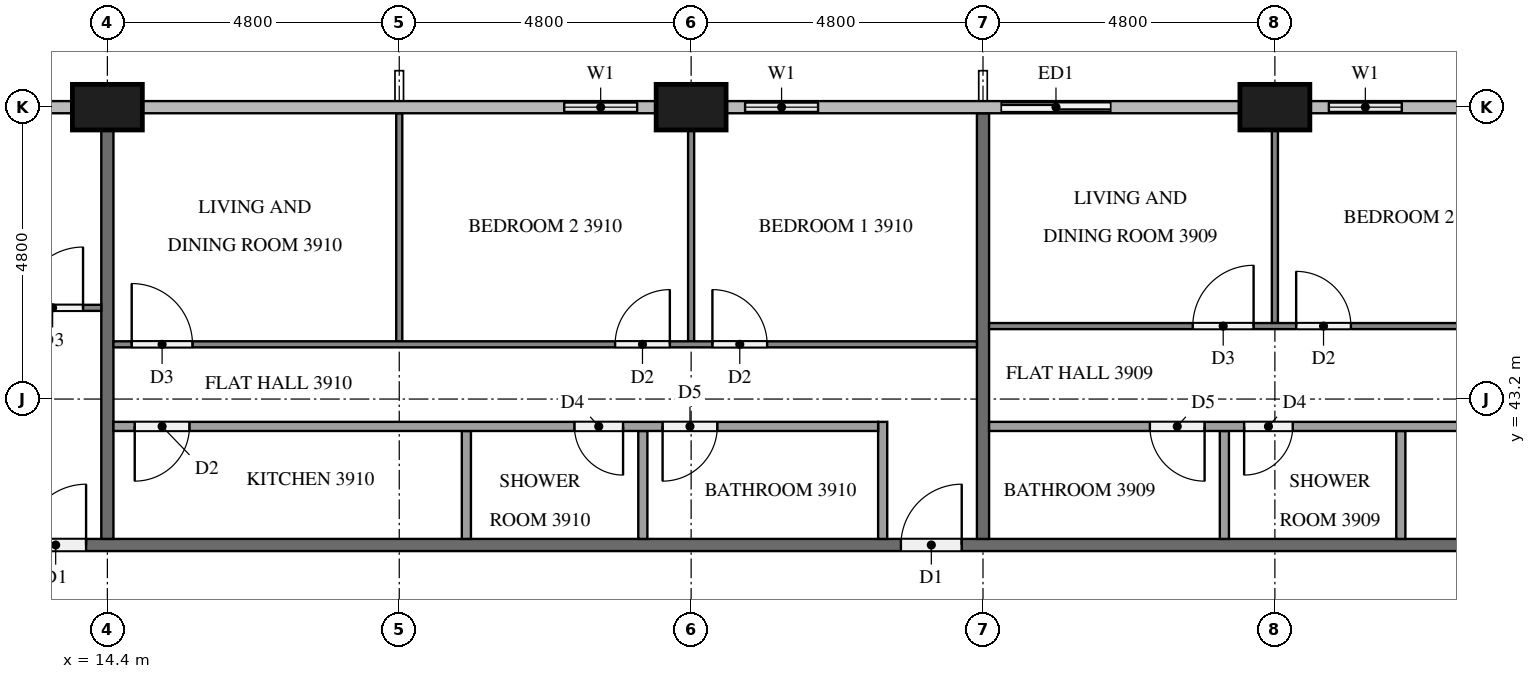
"""IFC4 building model, lengths in metres.
Left out: names, types, materials, properties, quantities, classifications, styles, units other than length and angle.
Written with IfcOpenShell. Run it as: python <this file> out.ifc"""

import sys

from ifc_helpers import new_model, si_unit, direction, frame, frame_2d, origin, origin_2d, place, context, subcontext, project, spatial, rectangle, extrude, element, fill, save


model = new_model("IFC4")
c1 = context("Model", 3, precision=1e-05, world=origin(), true_north=direction((0.0, 1.0)))
c2 = subcontext(c1, "Body", "Model", "MODEL_VIEW")
j1 = project(units=[si_unit("LENGTHUNIT", "METRE"), si_unit("PLANEANGLEUNIT", "RADIAN")], contexts=[c1])
p1 = place(None, origin())
s1 = spatial("IfcSite", under=j1, at=p1, CompositionType="ELEMENT")
p2 = place(p1, origin())
s2 = spatial("IfcBuilding", under=s1, at=p2, CompositionType="ELEMENT")
p3 = place(p2, frame((0.0, 0.0, 152.5)))
s3 = spatial("IfcBuildingStorey", under=s2, at=p3, CompositionType="ELEMENT", Elevation=152.5)
for number, where, z_axis, x_axis in (
    (1, (33.6, 48.0, 0.0), (0.0, 0.0, 1.0), (1.0, 0.0, 0.0)),
    (2, (24.0, 48.0, 0.0), (0.0, 0.0, 1.0), (1.0, 0.0, 0.0)),
    (3, (14.4, 48.0, 0.0), (0.0, 0.0, 1.0), (1.0, 0.0, 0.0)),
):
    element("IfcColumn", number, at=place(p3, frame(where, z_axis=z_axis, x_axis=x_axis)), inside=s3, PredefinedType="COLUMN", context=c2, shape_type="SweptSolid", body=[
        extrude(rectangle(XDim=1.15, YDim=0.75, at=origin_2d()), origin(), (0.0, 0.0, 1.0), 3.2),
    ])
p4 = place(p3, frame((36.0, 48.0, 0.0), z_axis=(0.0, 0.0, 1.0), x_axis=(-1.0, 0.0, 0.0)))
e4 = element("IfcWall", 4, at=p4, inside=s3, PredefinedType="SOLIDWALL", context=c2, shape_type="SweptSolid", body=[
    extrude(rectangle(XDim=1.825, YDim=0.15, at=frame_2d((0.913, 0.0))), origin(), (0.0, 0.0, 1.0), 3.2),
])
p5 = place(p4, frame((0.312, 0.0, 0.9)))
e5 = element("IfcOpeningElement", 5, at=p5, cuts=e4, PredefinedType="OPENING", context=c2, shape_type="SweptSolid", body=[
    extrude(rectangle(XDim=1.2, YDim=1.4, at=frame_2d((0.6, 0.7))), frame((0.0, 0.085, 0.0), z_axis=(0.0, -1.0, 0.0), x_axis=(1.0, 0.0, 0.0)), (0.0, 0.0, 1.0), 0.17),
])
p6 = place(p3, frame((31.2, 48.0, 0.0), z_axis=(0.0, 0.0, 1.0), x_axis=(-1.0, 0.0, 0.0)))
e6 = element("IfcWall", 6, at=p6, inside=s3, PredefinedType="SOLIDWALL", context=c2, shape_type="SweptSolid", body=[
    extrude(rectangle(XDim=2.4, YDim=0.15, at=frame_2d((1.2, 0.0))), origin(), (0.0, 0.0, 1.0), 3.2),
])
p7 = place(p6, frame((0.3, 0.0, 0.0)))
e7 = element("IfcOpeningElement", 7, at=p7, cuts=e6, PredefinedType="OPENING", context=c2, shape_type="SweptSolid", body=[
    extrude(rectangle(XDim=1.8, YDim=2.4, at=frame_2d((0.9, 1.2))), frame((0.0, 0.085, 0.0), z_axis=(0.0, -1.0, 0.0), x_axis=(1.0, 0.0, 0.0)), (0.0, 0.0, 1.0), 0.17),
])
p8 = place(p3, frame((26.4, 48.0, 0.0), z_axis=(0.0, 0.0, 1.0), x_axis=(-1.0, 0.0, 0.0)))
e8 = element("IfcWall", 8, at=p8, inside=s3, PredefinedType="SOLIDWALL", context=c2, shape_type="SweptSolid", body=[
    extrude(rectangle(XDim=1.825, YDim=0.15, at=frame_2d((0.913, 0.0))), origin(), (0.0, 0.0, 1.0), 3.2),
])
p9 = place(p8, frame((0.312, 0.0, 0.9)))
e9 = element("IfcOpeningElement", 9, at=p9, cuts=e8, PredefinedType="OPENING", context=c2, shape_type="SweptSolid", body=[
    extrude(rectangle(XDim=1.2, YDim=1.4, at=frame_2d((0.6, 0.7))), frame((0.0, 0.085, 0.0), z_axis=(0.0, -1.0, 0.0), x_axis=(1.0, 0.0, 0.0)), (0.0, 0.0, 1.0), 0.17),
])
p10 = place(p3, frame((23.425, 48.0, 0.0), z_axis=(0.0, 0.0, 1.0), x_axis=(-1.0, 0.0, 0.0)))
e10 = element("IfcWall", 10, at=p10, inside=s3, PredefinedType="SOLIDWALL", context=c2, shape_type="SweptSolid", body=[
    extrude(rectangle(XDim=1.825, YDim=0.15, at=frame_2d((0.913, 0.0))), origin(), (0.0, 0.0, 1.0), 3.2),
])
p11 = place(p10, frame((0.312, 0.0, 0.9)))
e11 = element("IfcOpeningElement", 11, at=p11, cuts=e10, PredefinedType="OPENING", context=c2, shape_type="SweptSolid", body=[
    extrude(rectangle(XDim=1.2, YDim=1.4, at=frame_2d((0.6, 0.7))), frame((0.0, 0.085, 0.0), z_axis=(0.0, -1.0, 0.0), x_axis=(1.0, 0.0, 0.0)), (0.0, 0.0, 1.0), 0.17),
])
p12 = place(p3, frame((11.9, 40.8, 0.0), z_axis=(0.0, 0.0, 1.0), x_axis=(1.0, 0.0, 0.0)))
e12 = element("IfcWall", 12, at=p12, inside=s3, PredefinedType="PARTITIONING", context=c2, shape_type="SweptSolid", body=[
    extrude(rectangle(XDim=38.6, YDim=0.2, at=frame_2d((19.3, 0.0))), origin(), (0.0, 0.0, 1.0), 3.2),
])
p13 = place(p12, frame((31.65, 0.0, 0.0)))
e13 = element("IfcOpeningElement", 13, at=p13, cuts=e12, PredefinedType="OPENING", context=c2, shape_type="SweptSolid", body=[
    extrude(rectangle(XDim=1.0, YDim=2.1, at=frame_2d((0.5, 1.05))), frame((0.0, 0.11, 0.0), z_axis=(0.0, -1.0, 0.0), x_axis=(1.0, 0.0, 0.0)), (0.0, 0.0, 1.0), 0.22),
])
p14 = place(p12, frame((29.95, 0.0, 0.0)))
e14 = element("IfcOpeningElement", 14, at=p14, cuts=e12, PredefinedType="OPENING", context=c2, shape_type="SweptSolid", body=[
    extrude(rectangle(XDim=1.0, YDim=2.1, at=frame_2d((0.5, 1.05))), frame((0.0, 0.11, 0.0), z_axis=(0.0, -1.0, 0.0), x_axis=(1.0, 0.0, 0.0)), (0.0, 0.0, 1.0), 0.22),
])
p15 = place(p12, frame((15.55, 0.0, 0.0)))
e15 = element("IfcOpeningElement", 15, at=p15, cuts=e12, PredefinedType="OPENING", context=c2, shape_type="SweptSolid", body=[
    extrude(rectangle(XDim=1.0, YDim=2.1, at=frame_2d((0.5, 1.05))), frame((0.0, 0.11, 0.0), z_axis=(0.0, -1.0, 0.0), x_axis=(1.0, 0.0, 0.0)), (0.0, 0.0, 1.0), 0.22),
])
p16 = place(p12, frame((1.15, 0.0, 0.0)))
e16 = element("IfcOpeningElement", 16, at=p16, cuts=e12, PredefinedType="OPENING", context=c2, shape_type="SweptSolid", body=[
    extrude(rectangle(XDim=1.0, YDim=2.1, at=frame_2d((0.5, 1.05))), frame((0.0, 0.11, 0.0), z_axis=(0.0, -1.0, 0.0), x_axis=(1.0, 0.0, 0.0)), (0.0, 0.0, 1.0), 0.22),
])
p17 = place(p3, frame((28.8, 47.9, 0.0), z_axis=(0.0, 0.0, 1.0), x_axis=(0.0, -1.0, 0.0)))
e17 = element("IfcWall", 17, at=p17, inside=s3, PredefinedType="PARTITIONING", context=c2, shape_type="SweptSolid", body=[
    extrude(rectangle(XDim=7.0, YDim=0.2, at=frame_2d((3.5, 0.0))), origin(), (0.0, 0.0, 1.0), 3.2),
])
p18 = place(p3, frame((14.4, 47.625, 0.0), z_axis=(0.0, 0.0, 1.0), x_axis=(0.0, -1.0, 0.0)))
e18 = element("IfcWall", 18, at=p18, inside=s3, PredefinedType="PARTITIONING", context=c2, shape_type="SweptSolid", body=[
    extrude(rectangle(XDim=6.725, YDim=0.2, at=frame_2d((3.363, 0.0))), origin(), (0.0, 0.0, 1.0), 3.2),
])
p19 = place(p3, frame((33.6, 44.45, 0.0), z_axis=(0.0, 0.0, 1.0), x_axis=(0.0, 1.0, 0.0)))
e19 = element("IfcWall", 19, at=p19, inside=s3, PredefinedType="PARTITIONING", context=c2, shape_type="SweptSolid", body=[
    extrude(rectangle(XDim=3.175, YDim=0.1, at=frame_2d((1.587, 0.0))), origin(), (0.0, 0.0, 1.0), 3.2),
])
p20 = place(p3, frame((28.9, 44.4, 0.0), z_axis=(0.0, 0.0, 1.0), x_axis=(1.0, 0.0, 0.0)))
e20 = element("IfcWall", 20, at=p20, inside=s3, PredefinedType="PARTITIONING", context=c2, shape_type="SweptSolid", body=[
    extrude(rectangle(XDim=14.2, YDim=0.1, at=frame_2d((7.1, 0.0))), origin(), (0.0, 0.0, 1.0), 3.2),
])
p21 = place(p20, frame((13.0, 0.0, 0.0)))
e21 = element("IfcOpeningElement", 21, at=p21, cuts=e20, PredefinedType="OPENING", context=c2, shape_type="SweptSolid", body=[
    extrude(rectangle(XDim=0.9, YDim=2.1, at=frame_2d((0.45, 1.05))), frame((0.0, 0.06, 0.0), z_axis=(0.0, -1.0, 0.0), x_axis=(1.0, 0.0, 0.0)), (0.0, 0.0, 1.0), 0.12),
])
p22 = place(p20, frame((5.05, 0.0, 0.0)))
e22 = element("IfcOpeningElement", 22, at=p22, cuts=e20, PredefinedType="OPENING", context=c2, shape_type="SweptSolid", body=[
    extrude(rectangle(XDim=0.9, YDim=2.1, at=frame_2d((0.45, 1.05))), frame((0.0, 0.06, 0.0), z_axis=(0.0, -1.0, 0.0), x_axis=(1.0, 0.0, 0.0)), (0.0, 0.0, 1.0), 0.12),
])
p23 = place(p20, frame((3.35, 0.0, 0.0)))
e23 = element("IfcOpeningElement", 23, at=p23, cuts=e20, PredefinedType="OPENING", context=c2, shape_type="SweptSolid", body=[
    extrude(rectangle(XDim=1.0, YDim=2.1, at=frame_2d((0.5, 1.05))), frame((0.0, 0.06, 0.0), z_axis=(0.0, -1.0, 0.0), x_axis=(1.0, 0.0, 0.0)), (0.0, 0.0, 1.0), 0.12),
])
for number, where, z_axis, x_axis in (
    (24, (35.671, 40.9, 0.0), (0.0, 0.0, 1.0), (0.0, 1.0, 0.0)),
    (25, (32.769, 40.9, 0.0), (0.0, 0.0, 1.0), (0.0, 1.0, 0.0)),
):
    element("IfcWall", number, at=place(p3, frame(where, z_axis=z_axis, x_axis=x_axis)), inside=s3, PredefinedType="PARTITIONING", context=c2, shape_type="SweptSolid", body=[
        extrude(rectangle(XDim=1.775, YDim=0.15, at=frame_2d((0.888, 0.0))), origin(), (0.0, 0.0, 1.0), 3.2),
    ])
p24 = place(p3, frame((41.475, 42.75, 0.0), z_axis=(0.0, 0.0, 1.0), x_axis=(-1.0, 0.0, 0.0)))
e26 = element("IfcWall", 26, at=p24, inside=s3, PredefinedType="PARTITIONING", context=c2, shape_type="SweptSolid", body=[
    extrude(rectangle(XDim=12.575, YDim=0.15, at=frame_2d((6.288, 0.0))), origin(), (0.0, 0.0, 1.0), 3.2),
])
p25 = place(p24, frame((0.3, 0.0, 0.0)))
e27 = element("IfcOpeningElement", 27, at=p25, cuts=e26, PredefinedType="OPENING", context=c2, shape_type="SweptSolid", body=[
    extrude(rectangle(XDim=0.9, YDim=2.1, at=frame_2d((0.45, 1.05))), frame((0.0, 0.085, 0.0), z_axis=(0.0, -1.0, 0.0), x_axis=(1.0, 0.0, 0.0)), (0.0, 0.0, 1.0), 0.17),
])
p26 = place(p24, frame((7.581, 0.0, 0.0)))
e28 = element("IfcOpeningElement", 28, at=p26, cuts=e26, PredefinedType="OPENING", context=c2, shape_type="SweptSolid", body=[
    extrude(rectangle(XDim=0.8, YDim=2.1, at=frame_2d((0.4, 1.05))), frame((0.0, 0.085, 0.0), z_axis=(0.0, -1.0, 0.0), x_axis=(1.0, 0.0, 0.0)), (0.0, 0.0, 1.0), 0.17),
])
p27 = place(p24, frame((9.031, 0.0, 0.0)))
e29 = element("IfcOpeningElement", 29, at=p27, cuts=e26, PredefinedType="OPENING", context=c2, shape_type="SweptSolid", body=[
    extrude(rectangle(XDim=0.9, YDim=2.1, at=frame_2d((0.45, 1.05))), frame((0.0, 0.085, 0.0), z_axis=(0.0, -1.0, 0.0), x_axis=(1.0, 0.0, 0.0)), (0.0, 0.0, 1.0), 0.17),
])
p28 = place(p3, frame((24.0, 44.15, 0.0), z_axis=(0.0, 0.0, 1.0), x_axis=(0.0, 1.0, 0.0)))
e30 = element("IfcWall", 30, at=p28, inside=s3, PredefinedType="PARTITIONING", context=c2, shape_type="SweptSolid", body=[
    extrude(rectangle(XDim=3.475, YDim=0.1, at=frame_2d((1.738, 0.0))), origin(), (0.0, 0.0, 1.0), 3.2),
])
p29 = place(p3, frame((19.2, 44.15, 0.0), z_axis=(0.0, 0.0, 1.0), x_axis=(0.0, 1.0, 0.0)))
e31 = element("IfcWall", 31, at=p29, inside=s3, PredefinedType="PARTITIONING", context=c2, shape_type="SweptSolid", body=[
    extrude(rectangle(XDim=3.75, YDim=0.1, at=frame_2d((1.875, 0.0))), origin(), (0.0, 0.0, 1.0), 3.2),
])
p30 = place(p3, frame((14.5, 44.1, 0.0), z_axis=(0.0, 0.0, 1.0), x_axis=(1.0, 0.0, 0.0)))
e32 = element("IfcWall", 32, at=p30, inside=s3, PredefinedType="PARTITIONING", context=c2, shape_type="SweptSolid", body=[
    extrude(rectangle(XDim=14.2, YDim=0.1, at=frame_2d((7.1, 0.0))), origin(), (0.0, 0.0, 1.0), 3.2),
])
p31 = place(p30, frame((9.85, 0.0, 0.0)))
e33 = element("IfcOpeningElement", 33, at=p31, cuts=e32, PredefinedType="OPENING", context=c2, shape_type="SweptSolid", body=[
    extrude(rectangle(XDim=0.9, YDim=2.1, at=frame_2d((0.45, 1.05))), frame((0.0, 0.06, 0.0), z_axis=(0.0, -1.0, 0.0), x_axis=(1.0, 0.0, 0.0)), (0.0, 0.0, 1.0), 0.12),
])
p32 = place(p30, frame((8.25, 0.0, 0.0)))
e34 = element("IfcOpeningElement", 34, at=p32, cuts=e32, PredefinedType="OPENING", context=c2, shape_type="SweptSolid", body=[
    extrude(rectangle(XDim=0.9, YDim=2.1, at=frame_2d((0.45, 1.05))), frame((0.0, 0.06, 0.0), z_axis=(0.0, -1.0, 0.0), x_axis=(1.0, 0.0, 0.0)), (0.0, 0.0, 1.0), 0.12),
])
p33 = place(p30, frame((0.3, 0.0, 0.0)))
e35 = element("IfcOpeningElement", 35, at=p33, cuts=e32, PredefinedType="OPENING", context=c2, shape_type="SweptSolid", body=[
    extrude(rectangle(XDim=1.0, YDim=2.1, at=frame_2d((0.5, 1.05))), frame((0.0, 0.06, 0.0), z_axis=(0.0, -1.0, 0.0), x_axis=(1.0, 0.0, 0.0)), (0.0, 0.0, 1.0), 0.12),
])
for number, where, z_axis, x_axis in (
    (36, (23.206, 40.9, 0.0), (0.0, 0.0, 1.0), (0.0, 1.0, 0.0)),
    (37, (20.304, 40.9, 0.0), (0.0, 0.0, 1.0), (0.0, 1.0, 0.0)),
):
    element("IfcWall", number, at=place(p3, frame(where, z_axis=z_axis, x_axis=x_axis)), inside=s3, PredefinedType="PARTITIONING", context=c2, shape_type="SweptSolid", body=[
        extrude(rectangle(XDim=1.775, YDim=0.15, at=frame_2d((0.888, 0.0))), origin(), (0.0, 0.0, 1.0), 3.2),
    ])
p34 = place(p3, frame((27.15, 40.9, 0.0), z_axis=(0.0, 0.0, 1.0), x_axis=(0.0, 1.0, 0.0)))
e38 = element("IfcWall", 38, at=p34, inside=s3, PredefinedType="PARTITIONING", context=c2, shape_type="SweptSolid", body=[
    extrude(rectangle(XDim=1.925, YDim=0.15, at=frame_2d((0.962, 0.0))), origin(), (0.0, 0.0, 1.0), 3.2),
])
p35 = place(p3, frame((27.075, 42.75, 0.0), z_axis=(0.0, 0.0, 1.0), x_axis=(-1.0, 0.0, 0.0)))
e39 = element("IfcWall", 39, at=p35, inside=s3, PredefinedType="PARTITIONING", context=c2, shape_type="SweptSolid", body=[
    extrude(rectangle(XDim=12.575, YDim=0.15, at=frame_2d((6.288, 0.0))), origin(), (0.0, 0.0, 1.0), 3.2),
])
p36 = place(p35, frame((2.644, 0.0, 0.0)))
e40 = element("IfcOpeningElement", 40, at=p36, cuts=e39, PredefinedType="OPENING", context=c2, shape_type="SweptSolid", body=[
    extrude(rectangle(XDim=0.9, YDim=2.1, at=frame_2d((0.45, 1.05))), frame((0.0, 0.085, 0.0), z_axis=(0.0, -1.0, 0.0), x_axis=(1.0, 0.0, 0.0)), (0.0, 0.0, 1.0), 0.17),
])
p37 = place(p35, frame((4.194, 0.0, 0.0)))
e41 = element("IfcOpeningElement", 41, at=p37, cuts=e39, PredefinedType="OPENING", context=c2, shape_type="SweptSolid", body=[
    extrude(rectangle(XDim=0.8, YDim=2.1, at=frame_2d((0.4, 1.05))), frame((0.0, 0.085, 0.0), z_axis=(0.0, -1.0, 0.0), x_axis=(1.0, 0.0, 0.0)), (0.0, 0.0, 1.0), 0.17),
])
p38 = place(p35, frame((11.325, 0.0, 0.0)))
e42 = element("IfcOpeningElement", 42, at=p38, cuts=e39, PredefinedType="OPENING", context=c2, shape_type="SweptSolid", body=[
    extrude(rectangle(XDim=0.9, YDim=2.1, at=frame_2d((0.45, 1.05))), frame((0.0, 0.085, 0.0), z_axis=(0.0, -1.0, 0.0), x_axis=(1.0, 0.0, 0.0)), (0.0, 0.0, 1.0), 0.17),
])
p39 = place(p3, frame((0.502, 44.7, 0.0), z_axis=(0.0, 0.0, 1.0), x_axis=(1.0, 0.0, 0.0)))
e43 = element("IfcWall", 43, at=p39, inside=s3, PredefinedType="PARTITIONING", context=c2, shape_type="SweptSolid", body=[
    extrude(rectangle(XDim=13.798, YDim=0.1, at=frame_2d((6.899, 0.0))), origin(), (0.0, 0.0, 1.0), 3.2),
])
p40 = place(p39, frame((12.498, 0.0, 0.0)))
e44 = element("IfcOpeningElement", 44, at=p40, cuts=e43, PredefinedType="OPENING", context=c2, shape_type="SweptSolid", body=[
    extrude(rectangle(XDim=1.0, YDim=2.1, at=frame_2d((0.5, 1.05))), frame((0.0, 0.06, 0.0), z_axis=(0.0, -1.0, 0.0), x_axis=(1.0, 0.0, 0.0)), (0.0, 0.0, 1.0), 0.12),
])
p41 = place(p39, frame((4.648, 0.0, 0.0)))
e45 = element("IfcOpeningElement", 45, at=p41, cuts=e43, PredefinedType="OPENING", context=c2, shape_type="SweptSolid", body=[
    extrude(rectangle(XDim=0.9, YDim=2.1, at=frame_2d((0.45, 1.05))), frame((0.0, 0.06, 0.0), z_axis=(0.0, -1.0, 0.0), x_axis=(1.0, 0.0, 0.0)), (0.0, 0.0, 1.0), 0.12),
])
p42 = place(p39, frame((3.048, 0.0, 0.0)))
e46 = element("IfcOpeningElement", 46, at=p42, cuts=e43, PredefinedType="OPENING", context=c2, shape_type="SweptSolid", body=[
    extrude(rectangle(XDim=0.9, YDim=2.1, at=frame_2d((0.45, 1.05))), frame((0.0, 0.06, 0.0), z_axis=(0.0, -1.0, 0.0), x_axis=(1.0, 0.0, 0.0)), (0.0, 0.0, 1.0), 0.12),
])
p43 = place(p5, origin())
e47 = element("IfcWindow", 47, at=p43, inside=s3, PartitioningType="SINGLE_PANEL", PredefinedType="WINDOW", context=c2, shape_type="SweptSolid", body=[
    extrude(rectangle(XDim=1.2, YDim=1.4, at=frame_2d((0.6, 0.7))), frame((0.0, 0.03, 0.0), z_axis=(0.0, -1.0, 0.0), x_axis=(1.0, 0.0, 0.0)), (0.0, 0.0, 1.0), 0.06),
])
fill(e5, e47)
p44 = place(p7, origin())
e48 = element("IfcDoor", 48, at=p44, inside=s3, OperationType="SLIDING_TO_LEFT", PredefinedType="DOOR", context=c2, shape_type="SweptSolid", body=[
    extrude(rectangle(XDim=1.8, YDim=2.4, at=frame_2d((0.9, 1.2))), frame((0.0, 0.025, 0.0), z_axis=(0.0, -1.0, 0.0), x_axis=(1.0, 0.0, 0.0)), (0.0, 0.0, 1.0), 0.05),
])
fill(e7, e48)
p45 = place(p9, origin())
e49 = element("IfcWindow", 49, at=p45, inside=s3, PartitioningType="SINGLE_PANEL", PredefinedType="WINDOW", context=c2, shape_type="SweptSolid", body=[
    extrude(rectangle(XDim=1.2, YDim=1.4, at=frame_2d((0.6, 0.7))), frame((0.0, 0.03, 0.0), z_axis=(0.0, -1.0, 0.0), x_axis=(1.0, 0.0, 0.0)), (0.0, 0.0, 1.0), 0.06),
])
fill(e9, e49)
p46 = place(p11, origin())
e50 = element("IfcWindow", 50, at=p46, inside=s3, PartitioningType="SINGLE_PANEL", PredefinedType="WINDOW", context=c2, shape_type="SweptSolid", body=[
    extrude(rectangle(XDim=1.2, YDim=1.4, at=frame_2d((0.6, 0.7))), frame((0.0, 0.03, 0.0), z_axis=(0.0, -1.0, 0.0), x_axis=(1.0, 0.0, 0.0)), (0.0, 0.0, 1.0), 0.06),
])
fill(e11, e50)
p47 = place(p15, origin())
e51 = element("IfcDoor", 51, at=p47, inside=s3, OperationType="SINGLE_SWING_RIGHT", PredefinedType="DOOR", context=c2, shape_type="SweptSolid", body=[
    extrude(rectangle(XDim=1.0, YDim=2.1, at=frame_2d((0.5, 1.05))), frame((0.0, 0.025, 0.0), z_axis=(0.0, -1.0, 0.0), x_axis=(1.0, 0.0, 0.0)), (0.0, 0.0, 1.0), 0.05),
])
fill(e15, e51)
p48 = place(p16, origin())
e52 = element("IfcDoor", 52, at=p48, inside=s3, OperationType="SINGLE_SWING_RIGHT", PredefinedType="DOOR", context=c2, shape_type="SweptSolid", body=[
    extrude(rectangle(XDim=1.0, YDim=2.1, at=frame_2d((0.5, 1.05))), frame((0.0, 0.025, 0.0), z_axis=(0.0, -1.0, 0.0), x_axis=(1.0, 0.0, 0.0)), (0.0, 0.0, 1.0), 0.05),
])
fill(e16, e52)
p49 = place(p22, origin())
e53 = element("IfcDoor", 53, at=p49, inside=s3, OperationType="SINGLE_SWING_LEFT", PredefinedType="DOOR", context=c2, shape_type="SweptSolid", body=[
    extrude(rectangle(XDim=0.9, YDim=2.1, at=frame_2d((0.45, 1.05))), frame((0.0, 0.025, 0.0), z_axis=(0.0, -1.0, 0.0), x_axis=(1.0, 0.0, 0.0)), (0.0, 0.0, 1.0), 0.05),
])
fill(e22, e53)
p50 = place(p23, origin())
e54 = element("IfcDoor", 54, at=p50, inside=s3, OperationType="SINGLE_SWING_RIGHT", PredefinedType="DOOR", context=c2, shape_type="SweptSolid", body=[
    extrude(rectangle(XDim=1.0, YDim=2.1, at=frame_2d((0.5, 1.05))), frame((0.0, 0.025, 0.0), z_axis=(0.0, -1.0, 0.0), x_axis=(1.0, 0.0, 0.0)), (0.0, 0.0, 1.0), 0.05),
])
fill(e23, e54)
p51 = place(p26, origin())
e55 = element("IfcDoor", 55, at=p51, inside=s3, OperationType="SINGLE_SWING_RIGHT", PredefinedType="DOOR", context=c2, shape_type="SweptSolid", body=[
    extrude(rectangle(XDim=0.8, YDim=2.1, at=frame_2d((0.4, 1.05))), frame((0.0, 0.025, 0.0), z_axis=(0.0, -1.0, 0.0), x_axis=(1.0, 0.0, 0.0)), (0.0, 0.0, 1.0), 0.05),
])
fill(e28, e55)
p52 = place(p27, origin())
e56 = element("IfcDoor", 56, at=p52, inside=s3, OperationType="SINGLE_SWING_LEFT", PredefinedType="DOOR", context=c2, shape_type="SweptSolid", body=[
    extrude(rectangle(XDim=0.9, YDim=2.1, at=frame_2d((0.45, 1.05))), frame((0.0, 0.025, 0.0), z_axis=(0.0, -1.0, 0.0), x_axis=(1.0, 0.0, 0.0)), (0.0, 0.0, 1.0), 0.05),
])
fill(e29, e56)
p53 = place(p31, origin())
e57 = element("IfcDoor", 57, at=p53, inside=s3, OperationType="SINGLE_SWING_LEFT", PredefinedType="DOOR", context=c2, shape_type="SweptSolid", body=[
    extrude(rectangle(XDim=0.9, YDim=2.1, at=frame_2d((0.45, 1.05))), frame((0.0, 0.025, 0.0), z_axis=(0.0, -1.0, 0.0), x_axis=(1.0, 0.0, 0.0)), (0.0, 0.0, 1.0), 0.05),
])
fill(e33, e57)
p54 = place(p32, origin())
e58 = element("IfcDoor", 58, at=p54, inside=s3, OperationType="SINGLE_SWING_RIGHT", PredefinedType="DOOR", context=c2, shape_type="SweptSolid", body=[
    extrude(rectangle(XDim=0.9, YDim=2.1, at=frame_2d((0.45, 1.05))), frame((0.0, 0.025, 0.0), z_axis=(0.0, -1.0, 0.0), x_axis=(1.0, 0.0, 0.0)), (0.0, 0.0, 1.0), 0.05),
])
fill(e34, e58)
p55 = place(p33, origin())
e59 = element("IfcDoor", 59, at=p55, inside=s3, OperationType="SINGLE_SWING_LEFT", PredefinedType="DOOR", context=c2, shape_type="SweptSolid", body=[
    extrude(rectangle(XDim=1.0, YDim=2.1, at=frame_2d((0.5, 1.05))), frame((0.0, 0.025, 0.0), z_axis=(0.0, -1.0, 0.0), x_axis=(1.0, 0.0, 0.0)), (0.0, 0.0, 1.0), 0.05),
])
fill(e35, e59)
p56 = place(p36, origin())
e60 = element("IfcDoor", 60, at=p56, inside=s3, OperationType="SINGLE_SWING_RIGHT", PredefinedType="DOOR", context=c2, shape_type="SweptSolid", body=[
    extrude(rectangle(XDim=0.9, YDim=2.1, at=frame_2d((0.45, 1.05))), frame((0.0, 0.025, 0.0), z_axis=(0.0, -1.0, 0.0), x_axis=(1.0, 0.0, 0.0)), (0.0, 0.0, 1.0), 0.05),
])
fill(e40, e60)
p57 = place(p37, origin())
e61 = element("IfcDoor", 61, at=p57, inside=s3, OperationType="SINGLE_SWING_LEFT", PredefinedType="DOOR", context=c2, shape_type="SweptSolid", body=[
    extrude(rectangle(XDim=0.8, YDim=2.1, at=frame_2d((0.4, 1.05))), frame((0.0, 0.025, 0.0), z_axis=(0.0, -1.0, 0.0), x_axis=(1.0, 0.0, 0.0)), (0.0, 0.0, 1.0), 0.05),
])
fill(e41, e61)
p58 = place(p38, origin())
e62 = element("IfcDoor", 62, at=p58, inside=s3, OperationType="SINGLE_SWING_RIGHT", PredefinedType="DOOR", context=c2, shape_type="SweptSolid", body=[
    extrude(rectangle(XDim=0.9, YDim=2.1, at=frame_2d((0.45, 1.05))), frame((0.0, 0.025, 0.0), z_axis=(0.0, -1.0, 0.0), x_axis=(1.0, 0.0, 0.0)), (0.0, 0.0, 1.0), 0.05),
])
fill(e42, e62)
p59 = place(p40, origin())
e63 = element("IfcDoor", 63, at=p59, inside=s3, OperationType="SINGLE_SWING_RIGHT", PredefinedType="DOOR", context=c2, shape_type="SweptSolid", body=[
    extrude(rectangle(XDim=1.0, YDim=2.1, at=frame_2d((0.5, 1.05))), frame((0.0, 0.025, 0.0), z_axis=(0.0, -1.0, 0.0), x_axis=(1.0, 0.0, 0.0)), (0.0, 0.0, 1.0), 0.05),
])
fill(e44, e63)
save(model, sys.argv[1])
